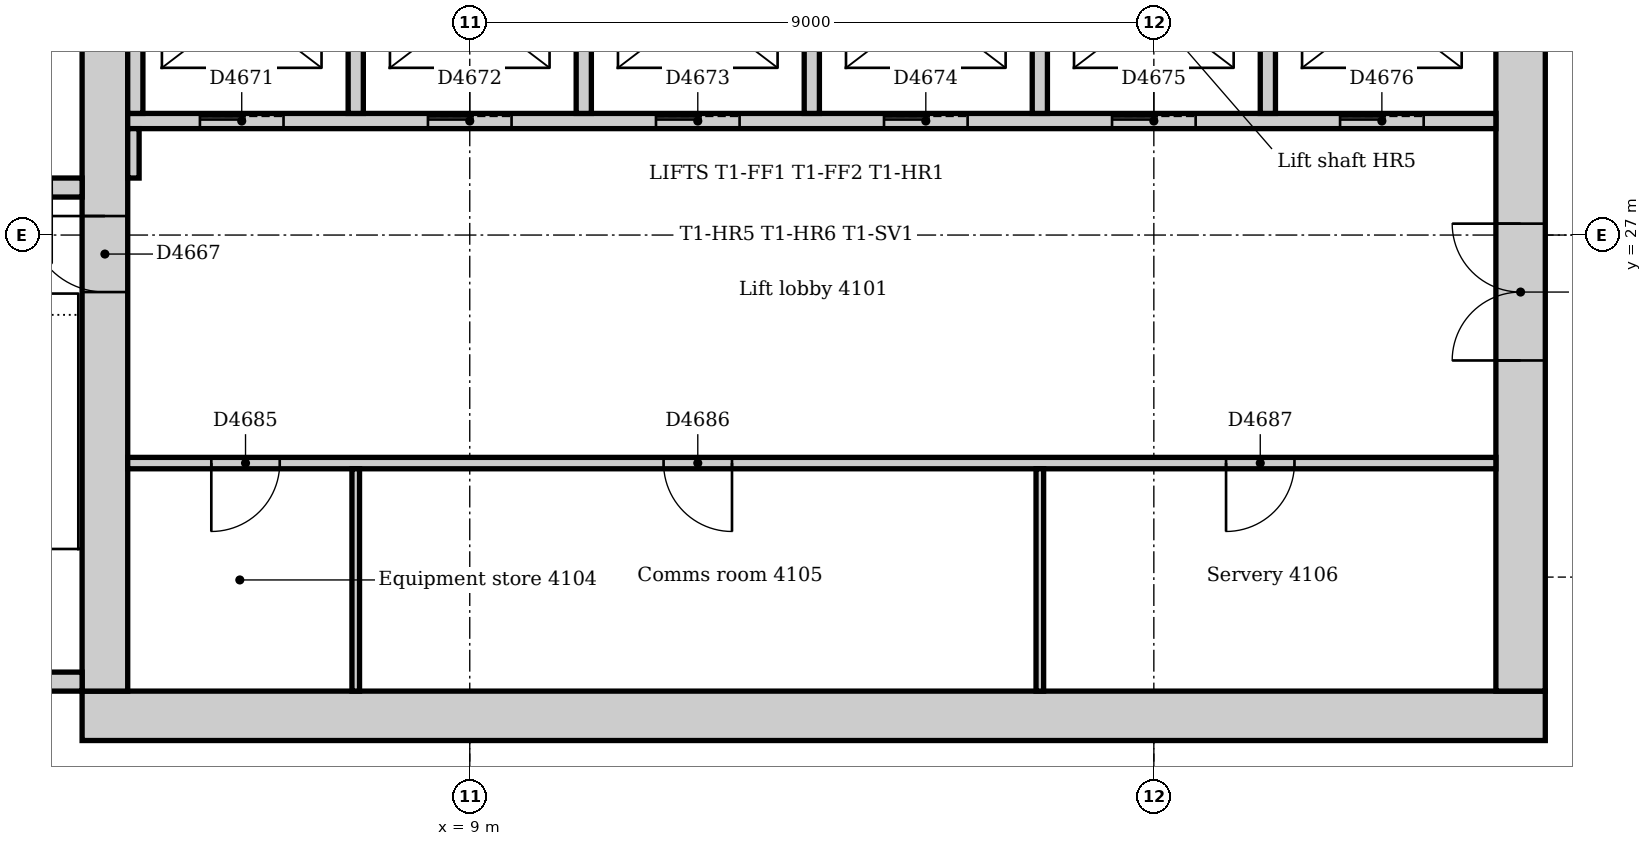
"""IFC4 building model, lengths in metres.
Left out: names, types, materials, properties, quantities, classifications, styles, units other than length and angle.
Written with IfcOpenShell. Run it as: python <this file> out.ifc"""

import sys

from ifc_helpers import new_model, si_unit, direction, frame, frame_2d, origin, place, context, subcontext, project, spatial, rectangle, extrude, element, fill, save


model = new_model("IFC4")
c1 = context("Model", 3, precision=1e-05, world=origin(), true_north=direction((0.0, 1.0)))
c2 = subcontext(c1, "Body", "Model", "MODEL_VIEW")
j1 = project(units=[si_unit("LENGTHUNIT", "METRE"), si_unit("PLANEANGLEUNIT", "RADIAN")], contexts=[c1])
p1 = place(None, origin())
s1 = spatial("IfcSite", under=j1, at=p1, CompositionType="ELEMENT")
p2 = place(p1, origin())
s2 = spatial("IfcBuilding", under=s1, at=p2, CompositionType="ELEMENT")
p3 = place(p2, frame((0.0, 0.0, 173.0)))
s3 = spatial("IfcBuildingStorey", under=s2, at=p3, CompositionType="ELEMENT", Elevation=173.0)
p4 = place(p3, frame((3.9, 20.675, 0.0), z_axis=(0.0, 0.0, 1.0), x_axis=(1.0, 0.0, 0.0)))
e1 = element("IfcWall", 1, at=p4, inside=s3, PredefinedType="SOLIDWALL", context=c2, shape_type="SweptSolid", body=[
    extrude(rectangle(XDim=19.25, YDim=0.65, at=frame_2d((9.625, 0.0))), origin(), (0.0, 0.0, 1.0), 4.0),
])
p5 = place(p3, frame((22.825, 21.0, 0.0), z_axis=(0.0, 0.0, 1.0), x_axis=(0.0, 1.0, 0.0)))
e2 = element("IfcWall", 2, at=p5, inside=s3, PredefinedType="SOLIDWALL", context=c2, shape_type="SweptSolid", body=[
    extrude(rectangle(XDim=10.5, YDim=0.65, at=frame_2d((5.25, 0.0))), origin(), (0.0, 0.0, 1.0), 4.0),
])
p6 = place(p5, frame((4.35, 0.0, 0.0)))
e3 = element("IfcOpeningElement", 3, at=p6, cuts=e2, PredefinedType="OPENING", context=c2, shape_type="SweptSolid", body=[
    extrude(rectangle(XDim=1.8, YDim=2.1, at=frame_2d((0.9, 1.05))), frame((0.0, 0.335, 0.0), z_axis=(0.0, -1.0, 0.0), x_axis=(1.0, 0.0, 0.0)), (0.0, 0.0, 1.0), 0.67),
])
p7 = place(p3, frame((4.2, 31.5, 0.0), z_axis=(0.0, 0.0, 1.0), x_axis=(0.0, -1.0, 0.0)))
e4 = element("IfcWall", 4, at=p7, inside=s3, PredefinedType="SOLIDWALL", context=c2, shape_type="SweptSolid", body=[
    extrude(rectangle(XDim=10.5, YDim=0.6, at=frame_2d((5.25, 0.0))), origin(), (0.0, 0.0, 1.0), 4.0),
])
p8 = place(p7, frame((4.25, 0.0, 0.0)))
e5 = element("IfcOpeningElement", 5, at=p8, cuts=e4, PredefinedType="OPENING", context=c2, shape_type="SweptSolid", body=[
    extrude(rectangle(XDim=1.0, YDim=2.1, at=frame_2d((0.5, 1.05))), frame((0.0, 0.31, 0.0), z_axis=(0.0, -1.0, 0.0), x_axis=(1.0, 0.0, 0.0)), (0.0, 0.0, 1.0), 0.62),
])
p9 = place(p3, frame((0.36, 21.125, 0.0), z_axis=(0.0, 0.0, 1.0), x_axis=(1.0, 0.0, 0.0)))
e6 = element("IfcWall", 6, at=p9, inside=s3, PredefinedType="SOLIDWALL", context=c2, shape_type="SweptSolid", body=[
    extrude(rectangle(XDim=3.54, YDim=0.25, at=frame_2d((1.77, 0.0))), origin(), (0.0, 0.0, 1.0), 4.0),
])
p10 = place(p3, frame((3.9, 27.625, 0.0), z_axis=(0.0, 0.0, 1.0), x_axis=(-1.0, 0.0, 0.0)))
e7 = element("IfcWall", 7, at=p10, inside=s3, PredefinedType="SOLIDWALL", context=c2, shape_type="SweptSolid", body=[
    extrude(rectangle(XDim=3.54, YDim=0.25, at=frame_2d((1.77, 0.0))), origin(), (0.0, 0.0, 1.0), 4.0),
])
p11 = place(p10, frame((0.4, 0.0, 0.0)))
e8 = element("IfcOpeningElement", 8, at=p11, cuts=e7, PredefinedType="OPENING", context=c2, shape_type="SweptSolid", body=[
    extrude(rectangle(XDim=1.0, YDim=2.1, at=frame_2d((0.5, 1.05))), frame((0.0, 0.135, 0.0), z_axis=(0.0, -1.0, 0.0), x_axis=(1.0, 0.0, 0.0)), (0.0, 0.0, 1.0), 0.27),
])
p12 = place(p3, frame((4.5, 28.5, 0.0), z_axis=(0.0, 0.0, 1.0), x_axis=(1.0, 0.0, 0.0)))
e9 = element("IfcWall", 9, at=p12, inside=s3, PredefinedType="PARTITIONING", context=c2, shape_type="SweptSolid", body=[
    extrude(rectangle(XDim=18.0, YDim=0.2, at=frame_2d((9.0, 0.0))), origin(), (0.0, 0.0, 1.0), 3.85),
])
p13 = place(p12, frame((0.95, 0.0, 0.0)))
e10 = element("IfcOpeningElement", 10, at=p13, cuts=e9, PredefinedType="OPENING", context=c2, shape_type="SweptSolid", body=[
    extrude(rectangle(XDim=1.1, YDim=2.1, at=frame_2d((0.55, 1.05))), frame((0.0, 0.11, 0.0), z_axis=(0.0, -1.0, 0.0), x_axis=(1.0, 0.0, 0.0)), (0.0, 0.0, 1.0), 0.22),
])
p14 = place(p12, frame((3.95, 0.0, 0.0)))
e11 = element("IfcOpeningElement", 11, at=p14, cuts=e9, PredefinedType="OPENING", context=c2, shape_type="SweptSolid", body=[
    extrude(rectangle(XDim=1.1, YDim=2.1, at=frame_2d((0.55, 1.05))), frame((0.0, 0.11, 0.0), z_axis=(0.0, -1.0, 0.0), x_axis=(1.0, 0.0, 0.0)), (0.0, 0.0, 1.0), 0.22),
])
p15 = place(p12, frame((6.95, 0.0, 0.0)))
e12 = element("IfcOpeningElement", 12, at=p15, cuts=e9, PredefinedType="OPENING", context=c2, shape_type="SweptSolid", body=[
    extrude(rectangle(XDim=1.1, YDim=2.1, at=frame_2d((0.55, 1.05))), frame((0.0, 0.11, 0.0), z_axis=(0.0, -1.0, 0.0), x_axis=(1.0, 0.0, 0.0)), (0.0, 0.0, 1.0), 0.22),
])
p16 = place(p12, frame((9.95, 0.0, 0.0)))
e13 = element("IfcOpeningElement", 13, at=p16, cuts=e9, PredefinedType="OPENING", context=c2, shape_type="SweptSolid", body=[
    extrude(rectangle(XDim=1.1, YDim=2.1, at=frame_2d((0.55, 1.05))), frame((0.0, 0.11, 0.0), z_axis=(0.0, -1.0, 0.0), x_axis=(1.0, 0.0, 0.0)), (0.0, 0.0, 1.0), 0.22),
])
p17 = place(p12, frame((12.95, 0.0, 0.0)))
e14 = element("IfcOpeningElement", 14, at=p17, cuts=e9, PredefinedType="OPENING", context=c2, shape_type="SweptSolid", body=[
    extrude(rectangle(XDim=1.1, YDim=2.1, at=frame_2d((0.55, 1.05))), frame((0.0, 0.11, 0.0), z_axis=(0.0, -1.0, 0.0), x_axis=(1.0, 0.0, 0.0)), (0.0, 0.0, 1.0), 0.22),
])
p18 = place(p12, frame((15.95, 0.0, 0.0)))
e15 = element("IfcOpeningElement", 15, at=p18, cuts=e9, PredefinedType="OPENING", context=c2, shape_type="SweptSolid", body=[
    extrude(rectangle(XDim=1.1, YDim=2.1, at=frame_2d((0.55, 1.05))), frame((0.0, 0.11, 0.0), z_axis=(0.0, -1.0, 0.0), x_axis=(1.0, 0.0, 0.0)), (0.0, 0.0, 1.0), 0.22),
])
for number, where, z_axis, x_axis in (
    (16, (10.5, 28.6, 0.0), (0.0, 0.0, 1.0), (0.0, 1.0, 0.0)),
    (17, (13.5, 28.6, 0.0), (0.0, 0.0, 1.0), (0.0, 1.0, 0.0)),
    (18, (16.5, 28.6, 0.0), (0.0, 0.0, 1.0), (0.0, 1.0, 0.0)),
    (19, (19.5, 28.6, 0.0), (0.0, 0.0, 1.0), (0.0, 1.0, 0.0)),
    (20, (4.6, 28.6, 0.0), (0.0, 0.0, 1.0), (0.0, 1.0, 0.0)),
    (21, (7.5, 28.6, 0.0), (0.0, 0.0, 1.0), (0.0, 1.0, 0.0)),
):
    element("IfcWall", number, at=place(p3, frame(where, z_axis=z_axis, x_axis=x_axis)), inside=s3, PredefinedType="PARTITIONING", context=c2, shape_type="SweptSolid", body=[
        extrude(rectangle(XDim=2.65, YDim=0.2, at=frame_2d((1.325, 0.0))), origin(), (0.0, 0.0, 1.0), 3.85),
    ])
p19 = place(p3, frame((4.5, 24.0, 0.0), z_axis=(0.0, 0.0, 1.0), x_axis=(1.0, 0.0, 0.0)))
e22 = element("IfcWall", 22, at=p19, inside=s3, PredefinedType="PARTITIONING", context=c2, shape_type="SweptSolid", body=[
    extrude(rectangle(XDim=18.0, YDim=0.15, at=frame_2d((9.0, 0.0))), origin(), (0.0, 0.0, 1.0), 3.85),
])
p20 = place(p19, frame((1.1, 0.0, 0.0)))
e23 = element("IfcOpeningElement", 23, at=p20, cuts=e22, PredefinedType="OPENING", context=c2, shape_type="SweptSolid", body=[
    extrude(rectangle(XDim=0.9, YDim=2.1, at=frame_2d((0.45, 1.05))), frame((0.0, 0.085, 0.0), z_axis=(0.0, -1.0, 0.0), x_axis=(1.0, 0.0, 0.0)), (0.0, 0.0, 1.0), 0.17),
])
p21 = place(p19, frame((7.05, 0.0, 0.0)))
e24 = element("IfcOpeningElement", 24, at=p21, cuts=e22, PredefinedType="OPENING", context=c2, shape_type="SweptSolid", body=[
    extrude(rectangle(XDim=0.9, YDim=2.1, at=frame_2d((0.45, 1.05))), frame((0.0, 0.085, 0.0), z_axis=(0.0, -1.0, 0.0), x_axis=(1.0, 0.0, 0.0)), (0.0, 0.0, 1.0), 0.17),
])
p22 = place(p19, frame((14.45, 0.0, 0.0)))
e25 = element("IfcOpeningElement", 25, at=p22, cuts=e22, PredefinedType="OPENING", context=c2, shape_type="SweptSolid", body=[
    extrude(rectangle(XDim=0.9, YDim=2.1, at=frame_2d((0.45, 1.05))), frame((0.0, 0.085, 0.0), z_axis=(0.0, -1.0, 0.0), x_axis=(1.0, 0.0, 0.0)), (0.0, 0.0, 1.0), 0.17),
])
p23 = place(p3, frame((4.575, 27.75, 0.0), z_axis=(0.0, 0.0, 1.0), x_axis=(0.0, 1.0, 0.0)))
e26 = element("IfcWall", 26, at=p23, inside=s3, PredefinedType="PARTITIONING", context=c2, shape_type="SweptSolid", body=[
    extrude(rectangle(XDim=0.65, YDim=0.15, at=frame_2d((0.325, 0.0))), origin(), (0.0, 0.0, 1.0), 3.85),
])
for number, where, z_axis, x_axis in (
    (27, (7.5, 21.0, 0.0), (0.0, 0.0, 1.0), (0.0, 1.0, 0.0)),
    (28, (16.5, 21.0, 0.0), (0.0, 0.0, 1.0), (0.0, 1.0, 0.0)),
):
    element("IfcWall", number, at=place(p3, frame(where, z_axis=z_axis, x_axis=x_axis)), inside=s3, PredefinedType="PARTITIONING", context=c2, shape_type="SweptSolid", body=[
        extrude(rectangle(XDim=2.925, YDim=0.1, at=frame_2d((1.462, 0.0))), origin(), (0.0, 0.0, 1.0), 3.85),
    ])
p24 = place(p8, frame((1.0, 0.0, 0.0), z_axis=(0.0, 0.0, 1.0), x_axis=(-1.0, 0.0, 0.0)))
e29 = element("IfcDoor", 29, at=p24, inside=s3, OperationType="SINGLE_SWING_RIGHT", PredefinedType="DOOR", context=c2, shape_type="SweptSolid", body=[
    extrude(rectangle(XDim=1.0, YDim=2.1, at=frame_2d((0.5, 1.05))), frame((0.0, 0.025, 0.0), z_axis=(0.0, -1.0, 0.0), x_axis=(1.0, 0.0, 0.0)), (0.0, 0.0, 1.0), 0.05),
])
fill(e5, e29)
p25 = place(p13, origin())
e30 = element("IfcDoor", 30, at=p25, inside=s3, OperationType="SLIDING_TO_LEFT", PredefinedType="DOOR", context=c2, shape_type="SweptSolid", body=[
    extrude(rectangle(XDim=1.1, YDim=2.1, at=frame_2d((0.55, 1.05))), frame((0.0, 0.025, 0.0), z_axis=(0.0, -1.0, 0.0), x_axis=(1.0, 0.0, 0.0)), (0.0, 0.0, 1.0), 0.05),
])
fill(e10, e30)
p26 = place(p14, origin())
e31 = element("IfcDoor", 31, at=p26, inside=s3, OperationType="SLIDING_TO_LEFT", PredefinedType="DOOR", context=c2, shape_type="SweptSolid", body=[
    extrude(rectangle(XDim=1.1, YDim=2.1, at=frame_2d((0.55, 1.05))), frame((0.0, 0.025, 0.0), z_axis=(0.0, -1.0, 0.0), x_axis=(1.0, 0.0, 0.0)), (0.0, 0.0, 1.0), 0.05),
])
fill(e11, e31)
p27 = place(p15, origin())
e32 = element("IfcDoor", 32, at=p27, inside=s3, OperationType="SLIDING_TO_LEFT", PredefinedType="DOOR", context=c2, shape_type="SweptSolid", body=[
    extrude(rectangle(XDim=1.1, YDim=2.1, at=frame_2d((0.55, 1.05))), frame((0.0, 0.025, 0.0), z_axis=(0.0, -1.0, 0.0), x_axis=(1.0, 0.0, 0.0)), (0.0, 0.0, 1.0), 0.05),
])
fill(e12, e32)
p28 = place(p16, origin())
e33 = element("IfcDoor", 33, at=p28, inside=s3, OperationType="SLIDING_TO_LEFT", PredefinedType="DOOR", context=c2, shape_type="SweptSolid", body=[
    extrude(rectangle(XDim=1.1, YDim=2.1, at=frame_2d((0.55, 1.05))), frame((0.0, 0.025, 0.0), z_axis=(0.0, -1.0, 0.0), x_axis=(1.0, 0.0, 0.0)), (0.0, 0.0, 1.0), 0.05),
])
fill(e13, e33)
p29 = place(p17, origin())
e34 = element("IfcDoor", 34, at=p29, inside=s3, OperationType="SLIDING_TO_LEFT", PredefinedType="DOOR", context=c2, shape_type="SweptSolid", body=[
    extrude(rectangle(XDim=1.1, YDim=2.1, at=frame_2d((0.55, 1.05))), frame((0.0, 0.025, 0.0), z_axis=(0.0, -1.0, 0.0), x_axis=(1.0, 0.0, 0.0)), (0.0, 0.0, 1.0), 0.05),
])
fill(e14, e34)
p30 = place(p18, origin())
e35 = element("IfcDoor", 35, at=p30, inside=s3, OperationType="SLIDING_TO_LEFT", PredefinedType="DOOR", context=c2, shape_type="SweptSolid", body=[
    extrude(rectangle(XDim=1.1, YDim=2.1, at=frame_2d((0.55, 1.05))), frame((0.0, 0.025, 0.0), z_axis=(0.0, -1.0, 0.0), x_axis=(1.0, 0.0, 0.0)), (0.0, 0.0, 1.0), 0.05),
])
fill(e15, e35)
p31 = place(p6, origin())
e36 = element("IfcDoor", 36, at=p31, inside=s3, OperationType="DOUBLE_DOOR_DOUBLE_SWING", PredefinedType="DOOR", context=c2, shape_type="SweptSolid", body=[
    extrude(rectangle(XDim=1.8, YDim=2.1, at=frame_2d((0.9, 1.05))), frame((0.0, 0.025, 0.0), z_axis=(0.0, -1.0, 0.0), x_axis=(1.0, 0.0, 0.0)), (0.0, 0.0, 1.0), 0.05),
])
fill(e3, e36)
p32 = place(p20, frame((0.9, 0.0, 0.0), z_axis=(0.0, 0.0, 1.0), x_axis=(-1.0, 0.0, 0.0)))
e37 = element("IfcDoor", 37, at=p32, inside=s3, OperationType="SINGLE_SWING_RIGHT", PredefinedType="DOOR", context=c2, shape_type="SweptSolid", body=[
    extrude(rectangle(XDim=0.9, YDim=2.1, at=frame_2d((0.45, 1.05))), frame((0.0, 0.025, 0.0), z_axis=(0.0, -1.0, 0.0), x_axis=(1.0, 0.0, 0.0)), (0.0, 0.0, 1.0), 0.05),
])
fill(e23, e37)
p33 = place(p21, frame((0.9, 0.0, 0.0), z_axis=(0.0, 0.0, 1.0), x_axis=(-1.0, 0.0, 0.0)))
e38 = element("IfcDoor", 38, at=p33, inside=s3, OperationType="SINGLE_SWING_LEFT", PredefinedType="DOOR", context=c2, shape_type="SweptSolid", body=[
    extrude(rectangle(XDim=0.9, YDim=2.1, at=frame_2d((0.45, 1.05))), frame((0.0, 0.025, 0.0), z_axis=(0.0, -1.0, 0.0), x_axis=(1.0, 0.0, 0.0)), (0.0, 0.0, 1.0), 0.05),
])
fill(e24, e38)
p34 = place(p22, frame((0.9, 0.0, 0.0), z_axis=(0.0, 0.0, 1.0), x_axis=(-1.0, 0.0, 0.0)))
e39 = element("IfcDoor", 39, at=p34, inside=s3, OperationType="SINGLE_SWING_RIGHT", PredefinedType="DOOR", context=c2, shape_type="SweptSolid", body=[
    extrude(rectangle(XDim=0.9, YDim=2.1, at=frame_2d((0.45, 1.05))), frame((0.0, 0.025, 0.0), z_axis=(0.0, -1.0, 0.0), x_axis=(1.0, 0.0, 0.0)), (0.0, 0.0, 1.0), 0.05),
])
fill(e25, e39)
save(model, sys.argv[1])
